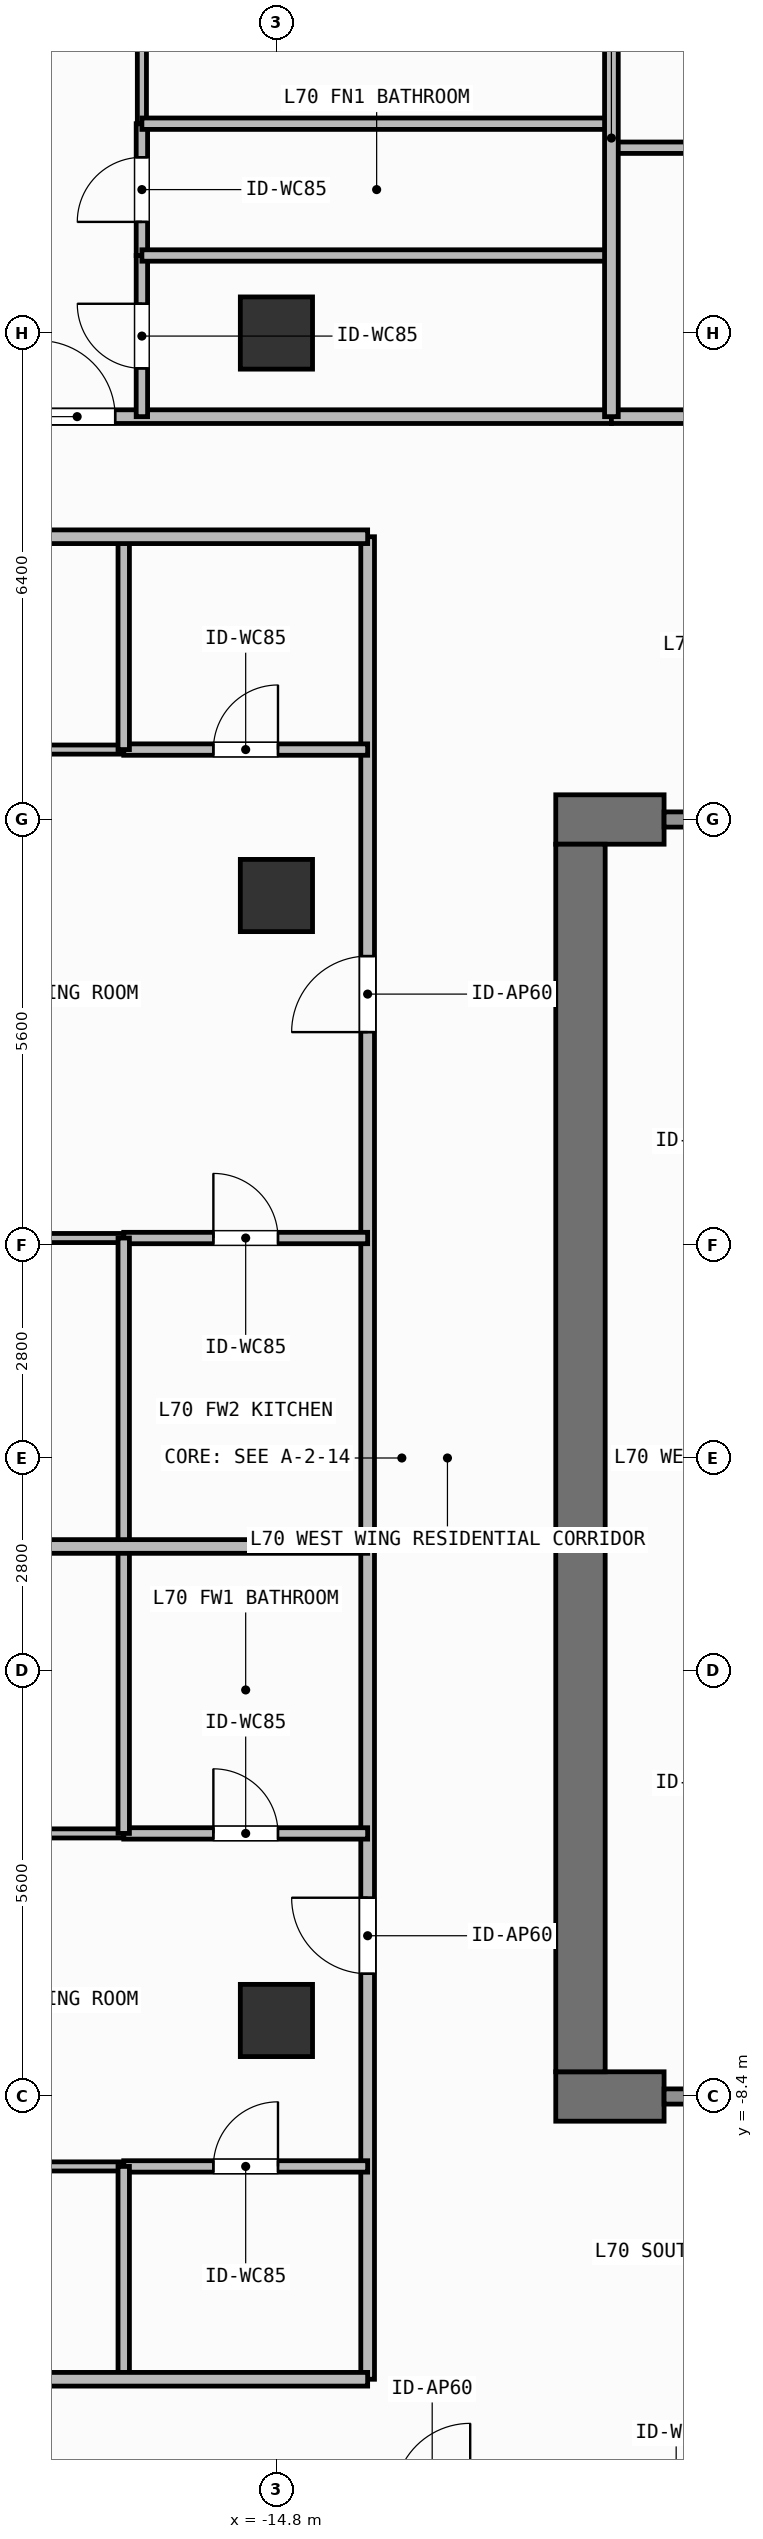
"""IFC4 building model, lengths in metres.
Left out: names, types, materials, properties, quantities, classifications, styles, units other than length and angle.
Written with IfcOpenShell. Run it as: python <this file> out.ifc"""

import sys

from ifc_helpers import new_model, si_unit, direction, frame, frame_2d, origin, origin_2d, place, context, subcontext, project, spatial, rectangle, extrude, element, fill, save


model = new_model("IFC4")
c1 = context("Model", 3, precision=1e-05, world=origin(), true_north=direction((0.0, 1.0)))
c2 = subcontext(c1, "Body", "Model", "MODEL_VIEW")
j1 = project(units=[si_unit("LENGTHUNIT", "METRE"), si_unit("PLANEANGLEUNIT", "RADIAN")], contexts=[c1])
p1 = place(None, origin())
s1 = spatial("IfcSite", under=j1, at=p1, CompositionType="ELEMENT")
p2 = place(p1, origin())
s2 = spatial("IfcBuilding", under=s1, at=p2, CompositionType="ELEMENT")
p3 = place(p2, frame((0.0, 0.0, 285.9)))
s3 = spatial("IfcBuildingStorey", under=s2, at=p3, CompositionType="ELEMENT", Elevation=285.9)
for number, where, z_axis, x_axis in (
    (1, (-11.125, -8.4, 0.0), (0.0, 0.0, 1.0), (1.0, 0.0, 0.0)),
    (2, (-11.125, 8.4, 0.0), (0.0, 0.0, 1.0), (1.0, 0.0, 0.0)),
):
    element("IfcWall", number, at=place(p3, frame(where, z_axis=z_axis, x_axis=x_axis)), inside=s3, PredefinedType="SHEAR", context=c2, shape_type="SweptSolid", body=[
        extrude(rectangle(XDim=1.425, YDim=0.65, at=frame_2d((0.712, 0.0))), origin(), (0.0, 0.0, 1.0), 3.9),
    ])
p4 = place(p3, frame((-10.8, -8.075, 0.0), z_axis=(0.0, 0.0, 1.0), x_axis=(0.0, 1.0, 0.0)))
e3 = element("IfcWall", 3, at=p4, inside=s3, PredefinedType="SHEAR", context=c2, shape_type="SweptSolid", body=[
    extrude(rectangle(XDim=16.15, YDim=0.65, at=frame_2d((8.075, 0.0))), origin(), (0.0, 0.0, 1.0), 3.9),
])
for number, where, z_axis, x_axis in (
    (4, (-14.8, 14.8, 0.0), (0.0, 0.0, 1.0), (1.0, 0.0, 0.0)),
    (5, (-14.8, -7.4, 0.0), (0.0, 0.0, 1.0), (1.0, 0.0, 0.0)),
    (6, (-14.8, 7.4, 0.0), (0.0, 0.0, 1.0), (1.0, 0.0, 0.0)),
):
    element("IfcColumn", number, at=place(p3, frame(where, z_axis=z_axis, x_axis=x_axis)), inside=s3, PredefinedType="COLUMN", context=c2, shape_type="SweptSolid", body=[
        extrude(rectangle(XDim=0.95, YDim=0.95, at=origin_2d()), origin(), (0.0, 0.0, 1.0), 3.9),
    ])
p5 = place(p3, frame((-9.7, -8.4, 0.0), z_axis=(0.0, 0.0, 1.0), x_axis=(1.0, 0.0, 0.0)))
e7 = element("IfcWall", 7, at=p5, inside=s3, PredefinedType="SOLIDWALL", context=c2, shape_type="SweptSolid", body=[
    extrude(rectangle(XDim=2.15, YDim=0.2, at=frame_2d((1.075, 0.0))), origin(), (0.0, 0.0, 1.0), 2.92),
])
p6 = place(p5, frame((0.598, 0.0, 0.0)))
e8 = element("IfcOpeningElement", 8, at=p6, cuts=e7, PredefinedType="OPENING", context=c2, shape_type="SweptSolid", body=[
    extrude(rectangle(XDim=1.1, YDim=2.15, at=frame_2d((0.55, 1.075))), frame((0.0, 0.11, 0.0), z_axis=(0.0, -1.0, 0.0), x_axis=(1.0, 0.0, 0.0)), (0.0, 0.0, 1.0), 0.22),
])
p7 = place(p3, frame((-9.7, 8.4, 0.0), z_axis=(0.0, 0.0, 1.0), x_axis=(1.0, 0.0, 0.0)))
e9 = element("IfcWall", 9, at=p7, inside=s3, PredefinedType="SOLIDWALL", context=c2, shape_type="SweptSolid", body=[
    extrude(rectangle(XDim=2.15, YDim=0.2, at=frame_2d((1.075, 0.0))), origin(), (0.0, 0.0, 1.0), 2.92),
])
p8 = place(p7, frame((0.598, 0.0, 0.0)))
e10 = element("IfcOpeningElement", 10, at=p8, cuts=e9, PredefinedType="OPENING", context=c2, shape_type="SweptSolid", body=[
    extrude(rectangle(XDim=1.1, YDim=2.15, at=frame_2d((0.55, 1.075))), frame((0.0, 0.11, 0.0), z_axis=(0.0, -1.0, 0.0), x_axis=(1.0, 0.0, 0.0)), (0.0, 0.0, 1.0), 0.22),
])
p9 = place(p3, frame((-19.32, 13.7, 0.0), z_axis=(0.0, 0.0, 1.0), x_axis=(1.0, 0.0, 0.0)))
e11 = element("IfcWall", 11, at=p9, inside=s3, PredefinedType="PARTITIONING", context=c2, shape_type="SweptSolid", body=[
    extrude(rectangle(XDim=8.927, YDim=0.18, at=frame_2d((4.463, 0.0))), origin(), (0.0, 0.0, 1.0), 3.68),
])
p10 = place(p9, frame((1.398, 0.0, 0.0)))
e12 = element("IfcOpeningElement", 12, at=p10, cuts=e11, PredefinedType="OPENING", context=c2, shape_type="SweptSolid", body=[
    extrude(rectangle(XDim=1.0, YDim=2.2, at=frame_2d((0.5, 1.1))), frame((0.0, 0.1, 0.0), z_axis=(0.0, -1.0, 0.0), x_axis=(1.0, 0.0, 0.0)), (0.0, 0.0, 1.0), 0.2),
])
p11 = place(p3, frame((-16.57, 13.7, 0.0), z_axis=(0.0, 0.0, 1.0), x_axis=(0.0, 1.0, 0.0)))
e13 = element("IfcWall", 13, at=p11, inside=s3, PredefinedType="PARTITIONING", context=c2, shape_type="SweptSolid", body=[
    extrude(rectangle(XDim=2.12, YDim=0.15, at=frame_2d((1.06, 0.0))), origin(), (0.0, 0.0, 1.0), 3.68),
])
p12 = place(p11, frame((0.635, 0.0, 0.0)))
e14 = element("IfcOpeningElement", 14, at=p12, cuts=e13, PredefinedType="OPENING", context=c2, shape_type="SweptSolid", body=[
    extrude(rectangle(XDim=0.85, YDim=2.1, at=frame_2d((0.425, 1.05))), frame((0.0, 0.085, 0.0), z_axis=(0.0, -1.0, 0.0), x_axis=(1.0, 0.0, 0.0)), (0.0, 0.0, 1.0), 0.17),
])
p13 = place(p3, frame((-16.57, 15.82, 0.0), z_axis=(0.0, 0.0, 1.0), x_axis=(0.0, 1.0, 0.0)))
e15 = element("IfcWall", 15, at=p13, inside=s3, PredefinedType="PARTITIONING", context=c2, shape_type="SweptSolid", body=[
    extrude(rectangle(XDim=1.734, YDim=0.15, at=frame_2d((0.867, 0.0))), origin(), (0.0, 0.0, 1.0), 3.68),
])
p14 = place(p13, frame((0.442, 0.0, 0.0)))
e16 = element("IfcOpeningElement", 16, at=p14, cuts=e15, PredefinedType="OPENING", context=c2, shape_type="SweptSolid", body=[
    extrude(rectangle(XDim=0.85, YDim=2.1, at=frame_2d((0.425, 1.05))), frame((0.0, 0.085, 0.0), z_axis=(0.0, -1.0, 0.0), x_axis=(1.0, 0.0, 0.0)), (0.0, 0.0, 1.0), 0.17),
])
p15 = place(p3, frame((-16.57, 17.554, 0.0), z_axis=(0.0, 0.0, 1.0), x_axis=(0.0, 1.0, 0.0)))
e17 = element("IfcWall", 17, at=p15, inside=s3, PredefinedType="PARTITIONING", context=c2, shape_type="SweptSolid", body=[
    extrude(rectangle(XDim=3.476, YDim=0.12, at=frame_2d((1.738, 0.0))), origin(), (0.0, 0.0, 1.0), 3.68),
])
p16 = place(p15, frame((1.201, 0.0, 0.0)))
e18 = element("IfcOpeningElement", 18, at=p16, cuts=e17, PredefinedType="OPENING", context=c2, shape_type="SweptSolid", body=[
    extrude(rectangle(XDim=0.9, YDim=2.1, at=frame_2d((0.45, 1.05))), frame((0.0, 0.07, 0.0), z_axis=(0.0, -1.0, 0.0), x_axis=(1.0, 0.0, 0.0)), (0.0, 0.0, 1.0), 0.14),
])
p17 = place(p3, frame((-10.393, 13.7, 0.0), z_axis=(0.0, 0.0, 1.0), x_axis=(1.0, 0.0, 0.0)))
e19 = element("IfcWall", 19, at=p17, inside=s3, PredefinedType="PARTITIONING", context=c2, shape_type="SweptSolid", body=[
    extrude(rectangle(XDim=15.835, YDim=0.18, at=frame_2d((7.917, 0.0))), origin(), (0.0, 0.0, 1.0), 3.68),
])
p18 = place(p17, frame((8.224, 0.0, 0.0)))
e20 = element("IfcOpeningElement", 20, at=p18, cuts=e19, PredefinedType="OPENING", context=c2, shape_type="SweptSolid", body=[
    extrude(rectangle(XDim=1.0, YDim=2.2, at=frame_2d((0.5, 1.1))), frame((0.0, 0.1, 0.0), z_axis=(0.0, -1.0, 0.0), x_axis=(1.0, 0.0, 0.0)), (0.0, 0.0, 1.0), 0.2),
])
p19 = place(p3, frame((-13.6, -12.12, 0.0), z_axis=(0.0, 0.0, 1.0), x_axis=(0.0, 1.0, 0.0)))
e21 = element("IfcWall", 21, at=p19, inside=s3, PredefinedType="PARTITIONING", context=c2, shape_type="SweptSolid", body=[
    extrude(rectangle(XDim=10.956, YDim=0.18, at=frame_2d((5.478, 0.0))), origin(), (0.0, 0.0, 1.0), 3.68),
])
p20 = place(p19, frame((5.335, 0.0, 0.0)))
e22 = element("IfcOpeningElement", 22, at=p20, cuts=e21, PredefinedType="OPENING", context=c2, shape_type="SweptSolid", body=[
    extrude(rectangle(XDim=1.0, YDim=2.2, at=frame_2d((0.5, 1.1))), frame((0.0, 0.1, 0.0), z_axis=(0.0, -1.0, 0.0), x_axis=(1.0, 0.0, 0.0)), (0.0, 0.0, 1.0), 0.2),
])
p21 = place(p3, frame((-16.809, -4.939, 0.0), z_axis=(0.0, 0.0, 1.0), x_axis=(1.0, 0.0, 0.0)))
e23 = element("IfcWall", 23, at=p21, inside=s3, PredefinedType="PARTITIONING", context=c2, shape_type="SweptSolid", body=[
    extrude(rectangle(XDim=3.209, YDim=0.15, at=frame_2d((1.604, 0.0))), origin(), (0.0, 0.0, 1.0), 3.68),
])
p22 = place(p21, frame((1.179, 0.0, 0.0)))
e24 = element("IfcOpeningElement", 24, at=p22, cuts=e23, PredefinedType="OPENING", context=c2, shape_type="SweptSolid", body=[
    extrude(rectangle(XDim=0.85, YDim=2.1, at=frame_2d((0.425, 1.05))), frame((0.0, 0.085, 0.0), z_axis=(0.0, -1.0, 0.0), x_axis=(1.0, 0.0, 0.0)), (0.0, 0.0, 1.0), 0.17),
])
p23 = place(p3, frame((-16.809, -9.32, 0.0), z_axis=(0.0, 0.0, 1.0), x_axis=(1.0, 0.0, 0.0)))
e25 = element("IfcWall", 25, at=p23, inside=s3, PredefinedType="PARTITIONING", context=c2, shape_type="SweptSolid", body=[
    extrude(rectangle(XDim=3.209, YDim=0.15, at=frame_2d((1.604, 0.0))), origin(), (0.0, 0.0, 1.0), 3.68),
])
p24 = place(p23, frame((1.179, 0.0, 0.0)))
e26 = element("IfcOpeningElement", 26, at=p24, cuts=e25, PredefinedType="OPENING", context=c2, shape_type="SweptSolid", body=[
    extrude(rectangle(XDim=0.85, YDim=2.1, at=frame_2d((0.425, 1.05))), frame((0.0, 0.085, 0.0), z_axis=(0.0, -1.0, 0.0), x_axis=(1.0, 0.0, 0.0)), (0.0, 0.0, 1.0), 0.17),
])
p25 = place(p3, frame((-22.53, -9.32, 0.0), z_axis=(0.0, 0.0, 1.0), x_axis=(1.0, 0.0, 0.0)))
e27 = element("IfcWall", 27, at=p25, inside=s3, PredefinedType="PARTITIONING", context=c2, shape_type="SweptSolid", body=[
    extrude(rectangle(XDim=5.721, YDim=0.12, at=frame_2d((2.86, 0.0))), origin(), (0.0, 0.0, 1.0), 3.68),
])
p26 = place(p25, frame((2.41, 0.0, 0.0)))
e28 = element("IfcOpeningElement", 28, at=p26, cuts=e27, PredefinedType="OPENING", context=c2, shape_type="SweptSolid", body=[
    extrude(rectangle(XDim=0.9, YDim=2.1, at=frame_2d((0.45, 1.05))), frame((0.0, 0.07, 0.0), z_axis=(0.0, -1.0, 0.0), x_axis=(1.0, 0.0, 0.0)), (0.0, 0.0, 1.0), 0.14),
])
p27 = place(p3, frame((-22.53, -4.939, 0.0), z_axis=(0.0, 0.0, 1.0), x_axis=(1.0, 0.0, 0.0)))
e29 = element("IfcWall", 29, at=p27, inside=s3, PredefinedType="PARTITIONING", context=c2, shape_type="SweptSolid", body=[
    extrude(rectangle(XDim=5.721, YDim=0.12, at=frame_2d((2.86, 0.0))), origin(), (0.0, 0.0, 1.0), 3.68),
])
p28 = place(p27, frame((2.41, 0.0, 0.0)))
e30 = element("IfcOpeningElement", 30, at=p28, cuts=e29, PredefinedType="OPENING", context=c2, shape_type="SweptSolid", body=[
    extrude(rectangle(XDim=0.9, YDim=2.1, at=frame_2d((0.45, 1.05))), frame((0.0, 0.07, 0.0), z_axis=(0.0, -1.0, 0.0), x_axis=(1.0, 0.0, 0.0)), (0.0, 0.0, 1.0), 0.14),
])
p29 = place(p3, frame((-13.6, -1.164, 0.0), z_axis=(0.0, 0.0, 1.0), x_axis=(0.0, 1.0, 0.0)))
e31 = element("IfcWall", 31, at=p29, inside=s3, PredefinedType="PARTITIONING", context=c2, shape_type="SweptSolid", body=[
    extrude(rectangle(XDim=13.284, YDim=0.18, at=frame_2d((6.642, 0.0))), origin(), (0.0, 0.0, 1.0), 3.68),
])
p30 = place(p29, frame((6.767, 0.0, 0.0)))
e32 = element("IfcOpeningElement", 32, at=p30, cuts=e31, PredefinedType="OPENING", context=c2, shape_type="SweptSolid", body=[
    extrude(rectangle(XDim=1.0, YDim=2.2, at=frame_2d((0.5, 1.1))), frame((0.0, 0.1, 0.0), z_axis=(0.0, -1.0, 0.0), x_axis=(1.0, 0.0, 0.0)), (0.0, 0.0, 1.0), 0.2),
])
p31 = place(p3, frame((-16.809, 9.32, 0.0), z_axis=(0.0, 0.0, 1.0), x_axis=(1.0, 0.0, 0.0)))
e33 = element("IfcWall", 33, at=p31, inside=s3, PredefinedType="PARTITIONING", context=c2, shape_type="SweptSolid", body=[
    extrude(rectangle(XDim=3.209, YDim=0.15, at=frame_2d((1.604, 0.0))), origin(), (0.0, 0.0, 1.0), 3.68),
])
p32 = place(p31, frame((1.179, 0.0, 0.0)))
e34 = element("IfcOpeningElement", 34, at=p32, cuts=e33, PredefinedType="OPENING", context=c2, shape_type="SweptSolid", body=[
    extrude(rectangle(XDim=0.85, YDim=2.1, at=frame_2d((0.425, 1.05))), frame((0.0, 0.085, 0.0), z_axis=(0.0, -1.0, 0.0), x_axis=(1.0, 0.0, 0.0)), (0.0, 0.0, 1.0), 0.17),
])
p33 = place(p3, frame((-16.809, 2.894, 0.0), z_axis=(0.0, 0.0, 1.0), x_axis=(1.0, 0.0, 0.0)))
e35 = element("IfcWall", 35, at=p33, inside=s3, PredefinedType="PARTITIONING", context=c2, shape_type="SweptSolid", body=[
    extrude(rectangle(XDim=3.209, YDim=0.15, at=frame_2d((1.604, 0.0))), origin(), (0.0, 0.0, 1.0), 3.68),
])
p34 = place(p33, frame((1.179, 0.0, 0.0)))
e36 = element("IfcOpeningElement", 36, at=p34, cuts=e35, PredefinedType="OPENING", context=c2, shape_type="SweptSolid", body=[
    extrude(rectangle(XDim=0.85, YDim=2.1, at=frame_2d((0.425, 1.05))), frame((0.0, 0.085, 0.0), z_axis=(0.0, -1.0, 0.0), x_axis=(1.0, 0.0, 0.0)), (0.0, 0.0, 1.0), 0.17),
])
p35 = place(p3, frame((-22.53, 2.894, 0.0), z_axis=(0.0, 0.0, 1.0), x_axis=(1.0, 0.0, 0.0)))
e37 = element("IfcWall", 37, at=p35, inside=s3, PredefinedType="PARTITIONING", context=c2, shape_type="SweptSolid", body=[
    extrude(rectangle(XDim=5.721, YDim=0.12, at=frame_2d((2.86, 0.0))), origin(), (0.0, 0.0, 1.0), 3.68),
])
p36 = place(p35, frame((2.41, 0.0, 0.0)))
e38 = element("IfcOpeningElement", 38, at=p36, cuts=e37, PredefinedType="OPENING", context=c2, shape_type="SweptSolid", body=[
    extrude(rectangle(XDim=0.9, YDim=2.1, at=frame_2d((0.45, 1.05))), frame((0.0, 0.07, 0.0), z_axis=(0.0, -1.0, 0.0), x_axis=(1.0, 0.0, 0.0)), (0.0, 0.0, 1.0), 0.14),
])
p37 = place(p3, frame((-22.53, 9.32, 0.0), z_axis=(0.0, 0.0, 1.0), x_axis=(1.0, 0.0, 0.0)))
e39 = element("IfcWall", 39, at=p37, inside=s3, PredefinedType="PARTITIONING", context=c2, shape_type="SweptSolid", body=[
    extrude(rectangle(XDim=5.721, YDim=0.12, at=frame_2d((2.86, 0.0))), origin(), (0.0, 0.0, 1.0), 3.68),
])
p38 = place(p37, frame((2.41, 0.0, 0.0)))
e40 = element("IfcOpeningElement", 40, at=p38, cuts=e39, PredefinedType="OPENING", context=c2, shape_type="SweptSolid", body=[
    extrude(rectangle(XDim=0.9, YDim=2.1, at=frame_2d((0.45, 1.05))), frame((0.0, 0.07, 0.0), z_axis=(0.0, -1.0, 0.0), x_axis=(1.0, 0.0, 0.0)), (0.0, 0.0, 1.0), 0.14),
])
for number, where, z_axis, x_axis in (
    (41, (-16.57, 15.82, 0.0), (0.0, 0.0, 1.0), (1.0, 0.0, 0.0)),
    (42, (-16.57, 17.554, 0.0), (0.0, 0.0, 1.0), (1.0, 0.0, 0.0)),
):
    element("IfcWall", number, at=place(p3, frame(where, z_axis=z_axis, x_axis=x_axis)), inside=s3, PredefinedType="PARTITIONING", context=c2, shape_type="SweptSolid", body=[
        extrude(rectangle(XDim=6.177, YDim=0.15, at=frame_2d((3.088, 0.0))), origin(), (0.0, 0.0, 1.0), 3.68),
    ])
p39 = place(p3, frame((-10.393, 17.238, 0.0), z_axis=(0.0, 0.0, 1.0), x_axis=(1.0, 0.0, 0.0)))
e43 = element("IfcWall", 43, at=p39, inside=s3, PredefinedType="PARTITIONING", context=c2, shape_type="SweptSolid", body=[
    extrude(rectangle(XDim=5.352, YDim=0.15, at=frame_2d((2.676, 0.0))), origin(), (0.0, 0.0, 1.0), 3.68),
])
p40 = place(p3, frame((-10.393, 13.7, 0.0), z_axis=(0.0, 0.0, 1.0), x_axis=(0.0, 1.0, 0.0)))
e44 = element("IfcWall", 44, at=p40, inside=s3, PredefinedType="PARTITIONING", context=c2, shape_type="SweptSolid", body=[
    extrude(rectangle(XDim=7.33, YDim=0.18, at=frame_2d((3.665, 0.0))), origin(), (0.0, 0.0, 1.0), 3.68),
])
p41 = place(p3, frame((-16.809, -12.12, 0.0), z_axis=(0.0, 0.0, 1.0), x_axis=(0.0, 1.0, 0.0)))
e45 = element("IfcWall", 45, at=p41, inside=s3, PredefinedType="PARTITIONING", context=c2, shape_type="SweptSolid", body=[
    extrude(rectangle(XDim=2.8, YDim=0.15, at=frame_2d((1.4, 0.0))), origin(), (0.0, 0.0, 1.0), 3.68),
])
p42 = place(p3, frame((-16.809, -4.939, 0.0), z_axis=(0.0, 0.0, 1.0), x_axis=(0.0, 1.0, 0.0)))
e46 = element("IfcWall", 46, at=p42, inside=s3, PredefinedType="PARTITIONING", context=c2, shape_type="SweptSolid", body=[
    extrude(rectangle(XDim=3.775, YDim=0.15, at=frame_2d((1.887, 0.0))), origin(), (0.0, 0.0, 1.0), 3.68),
])
p43 = place(p3, frame((-16.809, -1.164, 0.0), z_axis=(0.0, 0.0, 1.0), x_axis=(0.0, 1.0, 0.0)))
e47 = element("IfcWall", 47, at=p43, inside=s3, PredefinedType="PARTITIONING", context=c2, shape_type="SweptSolid", body=[
    extrude(rectangle(XDim=4.058, YDim=0.15, at=frame_2d((2.029, 0.0))), origin(), (0.0, 0.0, 1.0), 3.68),
])
p44 = place(p3, frame((-16.809, 9.32, 0.0), z_axis=(0.0, 0.0, 1.0), x_axis=(0.0, 1.0, 0.0)))
e48 = element("IfcWall", 48, at=p44, inside=s3, PredefinedType="PARTITIONING", context=c2, shape_type="SweptSolid", body=[
    extrude(rectangle(XDim=2.8, YDim=0.15, at=frame_2d((1.4, 0.0))), origin(), (0.0, 0.0, 1.0), 3.68),
])
for number, where, z_axis, x_axis in (
    (49, (-22.53, -1.164, 0.0), (0.0, 0.0, 1.0), (1.0, 0.0, 0.0)),
    (50, (-22.53, -12.12, 0.0), (0.0, 0.0, 1.0), (1.0, 0.0, 0.0)),
    (51, (-22.53, 12.12, 0.0), (0.0, 0.0, 1.0), (1.0, 0.0, 0.0)),
):
    element("IfcWall", number, at=place(p3, frame(where, z_axis=z_axis, x_axis=x_axis)), inside=s3, PredefinedType="PARTITIONING", context=c2, shape_type="SweptSolid", body=[
        extrude(rectangle(XDim=8.93, YDim=0.18, at=frame_2d((4.465, 0.0))), origin(), (0.0, 0.0, 1.0), 3.68),
    ])
p45 = place(p10, origin())
e52 = element("IfcDoor", 52, at=p45, inside=s3, OperationType="SINGLE_SWING_LEFT", PredefinedType="DOOR", context=c2, shape_type="SweptSolid", body=[
    extrude(rectangle(XDim=1.0, YDim=2.2, at=frame_2d((0.5, 1.1))), frame((0.0, 0.025, 0.0), z_axis=(0.0, -1.0, 0.0), x_axis=(1.0, 0.0, 0.0)), (0.0, 0.0, 1.0), 0.05),
])
fill(e12, e52)
p46 = place(p12, origin())
e53 = element("IfcDoor", 53, at=p46, inside=s3, OperationType="SINGLE_SWING_RIGHT", PredefinedType="DOOR", context=c2, shape_type="SweptSolid", body=[
    extrude(rectangle(XDim=0.85, YDim=2.1, at=frame_2d((0.425, 1.05))), frame((0.0, 0.025, 0.0), z_axis=(0.0, -1.0, 0.0), x_axis=(1.0, 0.0, 0.0)), (0.0, 0.0, 1.0), 0.05),
])
fill(e14, e53)
p47 = place(p14, origin())
e54 = element("IfcDoor", 54, at=p47, inside=s3, OperationType="SINGLE_SWING_LEFT", PredefinedType="DOOR", context=c2, shape_type="SweptSolid", body=[
    extrude(rectangle(XDim=0.85, YDim=2.1, at=frame_2d((0.425, 1.05))), frame((0.0, 0.025, 0.0), z_axis=(0.0, -1.0, 0.0), x_axis=(1.0, 0.0, 0.0)), (0.0, 0.0, 1.0), 0.05),
])
fill(e16, e54)
p48 = place(p20, origin())
e55 = element("IfcDoor", 55, at=p48, inside=s3, OperationType="SINGLE_SWING_RIGHT", PredefinedType="DOOR", context=c2, shape_type="SweptSolid", body=[
    extrude(rectangle(XDim=1.0, YDim=2.2, at=frame_2d((0.5, 1.1))), frame((0.0, 0.025, 0.0), z_axis=(0.0, -1.0, 0.0), x_axis=(1.0, 0.0, 0.0)), (0.0, 0.0, 1.0), 0.05),
])
fill(e22, e55)
p49 = place(p22, origin())
e56 = element("IfcDoor", 56, at=p49, inside=s3, OperationType="SINGLE_SWING_LEFT", PredefinedType="DOOR", context=c2, shape_type="SweptSolid", body=[
    extrude(rectangle(XDim=0.85, YDim=2.1, at=frame_2d((0.425, 1.05))), frame((0.0, 0.025, 0.0), z_axis=(0.0, -1.0, 0.0), x_axis=(1.0, 0.0, 0.0)), (0.0, 0.0, 1.0), 0.05),
])
fill(e24, e56)
p50 = place(p24, origin())
e57 = element("IfcDoor", 57, at=p50, inside=s3, OperationType="SINGLE_SWING_RIGHT", PredefinedType="DOOR", context=c2, shape_type="SweptSolid", body=[
    extrude(rectangle(XDim=0.85, YDim=2.1, at=frame_2d((0.425, 1.05))), frame((0.0, 0.025, 0.0), z_axis=(0.0, -1.0, 0.0), x_axis=(1.0, 0.0, 0.0)), (0.0, 0.0, 1.0), 0.05),
])
fill(e26, e57)
p51 = place(p30, origin())
e58 = element("IfcDoor", 58, at=p51, inside=s3, OperationType="SINGLE_SWING_LEFT", PredefinedType="DOOR", context=c2, shape_type="SweptSolid", body=[
    extrude(rectangle(XDim=1.0, YDim=2.2, at=frame_2d((0.5, 1.1))), frame((0.0, 0.025, 0.0), z_axis=(0.0, -1.0, 0.0), x_axis=(1.0, 0.0, 0.0)), (0.0, 0.0, 1.0), 0.05),
])
fill(e32, e58)
p52 = place(p32, origin())
e59 = element("IfcDoor", 59, at=p52, inside=s3, OperationType="SINGLE_SWING_RIGHT", PredefinedType="DOOR", context=c2, shape_type="SweptSolid", body=[
    extrude(rectangle(XDim=0.85, YDim=2.1, at=frame_2d((0.425, 1.05))), frame((0.0, 0.025, 0.0), z_axis=(0.0, -1.0, 0.0), x_axis=(1.0, 0.0, 0.0)), (0.0, 0.0, 1.0), 0.05),
])
fill(e34, e59)
p53 = place(p34, origin())
e60 = element("IfcDoor", 60, at=p53, inside=s3, OperationType="SINGLE_SWING_LEFT", PredefinedType="DOOR", context=c2, shape_type="SweptSolid", body=[
    extrude(rectangle(XDim=0.85, YDim=2.1, at=frame_2d((0.425, 1.05))), frame((0.0, 0.025, 0.0), z_axis=(0.0, -1.0, 0.0), x_axis=(1.0, 0.0, 0.0)), (0.0, 0.0, 1.0), 0.05),
])
fill(e36, e60)
save(model, sys.argv[1])
